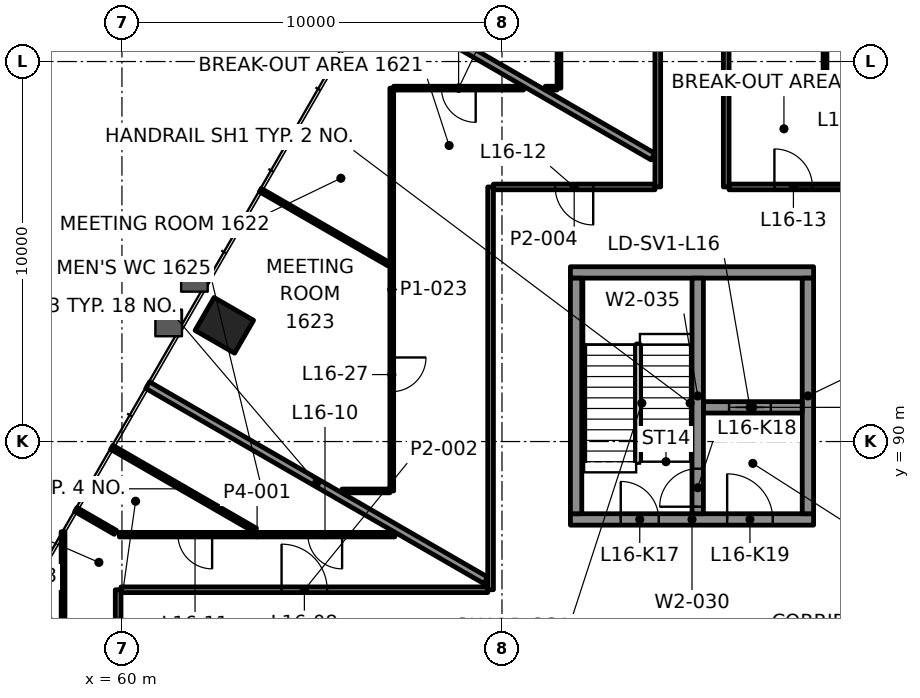
"""IFC4 building model, lengths in metres.
Left out: names, types, materials, properties, quantities, classifications, styles, units other than length and angle.
Written with IfcOpenShell. Run it as: python <this file> out.ifc"""

import sys

from ifc_helpers import new_model, si_unit, direction, frame, frame_2d, origin, origin_2d, place, context, subcontext, project, spatial, rectangle, extrude, element, fill, save


model = new_model("IFC4")
c1 = context("Model", 3, precision=1e-05, world=origin(), true_north=direction((0.0, 1.0)))
c2 = subcontext(c1, "Body", "Model", "MODEL_VIEW")
j1 = project(units=[si_unit("LENGTHUNIT", "METRE"), si_unit("PLANEANGLEUNIT", "RADIAN")], contexts=[c1])
p1 = place(None, origin())
s1 = spatial("IfcSite", under=j1, at=p1, CompositionType="ELEMENT")
p2 = place(p1, origin())
s2 = spatial("IfcBuilding", under=s1, at=p2, CompositionType="ELEMENT")
p3 = place(p2, frame((0.0, 0.0, 73.6)))
s3 = spatial("IfcBuildingStorey", under=s2, at=p3, CompositionType="ELEMENT", Elevation=73.6)
for number, where, z_axis, x_axis in (
    (1, (62.694, 93.057, -0.0), (0.0, 0.0, 1.0), (-0.5, -0.866, 0.0)),
    (2, (57.951, 84.843, -0.0), (0.0, 0.0, 1.0), (-0.5, -0.866, 0.0)),
):
    element("IfcColumn", number, at=place(p3, frame(where, z_axis=z_axis, x_axis=x_axis)), inside=s3, PredefinedType="COLUMN", context=c2, shape_type="SweptSolid", body=[
        extrude(rectangle(XDim=1.0, YDim=1.2, at=origin_2d()), origin(), (0.0, 0.0, 1.0), 4.2),
    ])
p4 = place(p3, frame((71.8, 87.95, 0.0), z_axis=(0.0, 0.0, 1.0), x_axis=(1.0, 0.0, 0.0)))
e3 = element("IfcWall", 3, at=p4, inside=s3, PredefinedType="SHEAR", context=c2, shape_type="SweptSolid", body=[
    extrude(rectangle(XDim=6.4, YDim=0.3, at=frame_2d((3.2, 0.0))), origin(), (0.0, 0.0, 1.0), 4.0),
])
p5 = place(p4, frame((1.325, 0.0, 0.0)))
e4 = element("IfcOpeningElement", 4, at=p5, cuts=e3, PredefinedType="OPENING", context=c2, shape_type="SweptSolid", body=[
    extrude(rectangle(XDim=1.0, YDim=2.1, at=frame_2d((0.5, 1.05))), frame((0.0, 0.16, 0.0), z_axis=(0.0, -1.0, 0.0), x_axis=(1.0, 0.0, 0.0)), (0.0, 0.0, 1.0), 0.32),
])
p6 = place(p4, frame((4.125, 0.0, 0.0)))
e5 = element("IfcOpeningElement", 5, at=p6, cuts=e3, PredefinedType="OPENING", context=c2, shape_type="SweptSolid", body=[
    extrude(rectangle(XDim=1.2, YDim=2.1, at=frame_2d((0.6, 1.05))), frame((0.0, 0.16, 0.0), z_axis=(0.0, -1.0, 0.0), x_axis=(1.0, 0.0, 0.0)), (0.0, 0.0, 1.0), 0.32),
])
p7 = place(p3, frame((71.8, 94.45, 0.0), z_axis=(0.0, 0.0, 1.0), x_axis=(1.0, 0.0, 0.0)))
e6 = element("IfcWall", 6, at=p7, inside=s3, PredefinedType="SHEAR", context=c2, shape_type="SweptSolid", body=[
    extrude(rectangle(XDim=6.4, YDim=0.3, at=frame_2d((3.2, 0.0))), origin(), (0.0, 0.0, 1.0), 4.0),
])
for number, where, z_axis, x_axis in (
    (7, (71.95, 88.1, 0.0), (0.0, 0.0, 1.0), (0.0, 1.0, 0.0)),
    (8, (78.05, 88.1, 0.0), (0.0, 0.0, 1.0), (0.0, 1.0, 0.0)),
):
    element("IfcWall", number, at=place(p3, frame(where, z_axis=z_axis, x_axis=x_axis)), inside=s3, PredefinedType="SHEAR", context=c2, shape_type="SweptSolid", body=[
        extrude(rectangle(XDim=6.2, YDim=0.3, at=frame_2d((3.1, 0.0))), origin(), (0.0, 0.0, 1.0), 4.0),
    ])
p8 = place(p3, frame((75.3, 90.9, 0.0), z_axis=(0.0, 0.0, 1.0), x_axis=(1.0, 0.0, 0.0)))
e9 = element("IfcWall", 9, at=p8, inside=s3, PredefinedType="SHEAR", context=c2, shape_type="SweptSolid", body=[
    extrude(rectangle(XDim=2.6, YDim=0.3, at=frame_2d((1.3, 0.0))), origin(), (0.0, 0.0, 1.0), 4.0),
])
p9 = place(p8, frame((0.675, 0.0, 0.0)))
e10 = element("IfcOpeningElement", 10, at=p9, cuts=e9, PredefinedType="OPENING", context=c2, shape_type="SweptSolid", body=[
    extrude(rectangle(XDim=1.1, YDim=2.1, at=frame_2d((0.55, 1.05))), frame((0.0, 0.16, 0.0), z_axis=(0.0, -1.0, 0.0), x_axis=(1.0, 0.0, 0.0)), (0.0, 0.0, 1.0), 0.32),
])
p10 = place(p3, frame((75.15, 88.1, 0.0), z_axis=(0.0, 0.0, 1.0), x_axis=(0.0, 1.0, 0.0)))
e11 = element("IfcWall", 11, at=p10, inside=s3, PredefinedType="SHEAR", context=c2, shape_type="SweptSolid", body=[
    extrude(rectangle(XDim=6.2, YDim=0.3, at=frame_2d((3.1, 0.0))), origin(), (0.0, 0.0, 1.0), 4.0),
])
p11 = place(p10, frame((0.185, 0.0, 0.0)))
e12 = element("IfcOpeningElement", 12, at=p11, cuts=e11, PredefinedType="OPENING", context=c2, shape_type="SweptSolid", body=[
    extrude(rectangle(XDim=1.0, YDim=2.1, at=frame_2d((0.5, 1.05))), frame((0.0, 0.16, 0.0), z_axis=(0.0, -1.0, 0.0), x_axis=(1.0, 0.0, 0.0)), (0.0, 0.0, 1.0), 0.32),
])
p12 = place(p3, frame((59.976, 86.1, 0.0), z_axis=(0.0, 0.0, 1.0), x_axis=(1.0, 0.0, 0.0)))
e13 = element("IfcWall", 13, at=p12, inside=s3, PredefinedType="PARTITIONING", context=c2, shape_type="SweptSolid", body=[
    extrude(rectangle(XDim=9.649, YDim=0.15, at=frame_2d((4.825, 0.0))), origin(), (0.0, 0.0, 1.0), 3.4),
])
p13 = place(p12, frame((4.225, 0.0, 0.0)))
e14 = element("IfcOpeningElement", 14, at=p13, cuts=e13, PredefinedType="OPENING", context=c2, shape_type="SweptSolid", body=[
    extrude(rectangle(XDim=1.2, YDim=2.1, at=frame_2d((0.6, 1.05))), frame((0.0, 0.085, 0.0), z_axis=(0.0, -1.0, 0.0), x_axis=(1.0, 0.0, 0.0)), (0.0, 0.0, 1.0), 0.17),
])
p14 = place(p3, frame((67.181, 87.55, 0.0), z_axis=(0.0, 0.0, 1.0), x_axis=(-1.0, 0.0, 0.0)))
e15 = element("IfcWall", 15, at=p14, inside=s3, PredefinedType="PARTITIONING", context=c2, shape_type="SweptSolid", body=[
    extrude(rectangle(XDim=7.249, YDim=0.12, at=frame_2d((3.625, 0.0))), origin(), (0.0, 0.0, 1.0), 3.4),
])
p15 = place(p14, frame((1.388, 0.0, 0.0)))
e16 = element("IfcOpeningElement", 16, at=p15, cuts=e15, PredefinedType="OPENING", context=c2, shape_type="SweptSolid", body=[
    extrude(rectangle(XDim=0.9, YDim=2.1, at=frame_2d((0.45, 1.05))), frame((0.0, 0.07, 0.0), z_axis=(0.0, -1.0, 0.0), x_axis=(1.0, 0.0, 0.0)), (0.0, 0.0, 1.0), 0.14),
])
p16 = place(p14, frame((4.807, 0.0, 0.0)))
e17 = element("IfcOpeningElement", 17, at=p16, cuts=e15, PredefinedType="OPENING", context=c2, shape_type="SweptSolid", body=[
    extrude(rectangle(XDim=0.9, YDim=2.1, at=frame_2d((0.45, 1.05))), frame((0.0, 0.07, 0.0), z_axis=(0.0, -1.0, 0.0), x_axis=(1.0, 0.0, 0.0)), (0.0, 0.0, 1.0), 0.14),
])
p17 = place(p3, frame((65.789, 88.7, 0.0), z_axis=(0.0, 0.0, 1.0), x_axis=(1.0, 0.0, 0.0)))
e18 = element("IfcWall", 18, at=p17, inside=s3, PredefinedType="PARTITIONING", context=c2, shape_type="SweptSolid", body=[
    extrude(rectangle(XDim=1.261, YDim=0.1, at=frame_2d((0.631, 0.0))), origin(), (0.0, 0.0, 1.0), 3.4),
])
p18 = place(p3, frame((74.025, 96.7, 0.0), z_axis=(0.0, 0.0, 1.0), x_axis=(-1.0, 0.0, 0.0)))
e19 = element("IfcWall", 19, at=p18, inside=s3, PredefinedType="PARTITIONING", context=c2, shape_type="SweptSolid", body=[
    extrude(rectangle(XDim=4.25, YDim=0.15, at=frame_2d((2.125, 0.0))), origin(), (0.0, 0.0, 1.0), 3.4),
])
p19 = place(p18, frame((1.625, 0.0, 0.0)))
e20 = element("IfcOpeningElement", 20, at=p19, cuts=e19, PredefinedType="OPENING", context=c2, shape_type="SweptSolid", body=[
    extrude(rectangle(XDim=1.0, YDim=2.1, at=frame_2d((0.5, 1.05))), frame((0.0, 0.085, 0.0), z_axis=(0.0, -1.0, 0.0), x_axis=(1.0, 0.0, 0.0)), (0.0, 0.0, 1.0), 0.17),
])
p20 = place(p3, frame((75.975, 96.7, 0.0), z_axis=(0.0, 0.0, 1.0), x_axis=(1.0, 0.0, 0.0)))
e21 = element("IfcWall", 21, at=p20, inside=s3, PredefinedType="PARTITIONING", context=c2, shape_type="SweptSolid", body=[
    extrude(rectangle(XDim=3.387, YDim=0.15, at=frame_2d((1.693, 0.0))), origin(), (0.0, 0.0, 1.0), 3.4),
])
p21 = place(p20, frame((1.194, 0.0, 0.0)))
e22 = element("IfcOpeningElement", 22, at=p21, cuts=e21, PredefinedType="OPENING", context=c2, shape_type="SweptSolid", body=[
    extrude(rectangle(XDim=1.0, YDim=2.1, at=frame_2d((0.5, 1.05))), frame((0.0, 0.085, 0.0), z_axis=(0.0, -1.0, 0.0), x_axis=(1.0, 0.0, 0.0)), (0.0, 0.0, 1.0), 0.17),
])
p22 = place(p3, frame((70.567, 99.3, 0.0), z_axis=(0.0, 0.0, 1.0), x_axis=(-1.0, 0.0, 0.0)))
e23 = element("IfcWall", 23, at=p22, inside=s3, PredefinedType="PARTITIONING", context=c2, shape_type="SweptSolid", body=[
    extrude(rectangle(XDim=3.417, YDim=0.1, at=frame_2d((1.708, 0.0))), origin(), (0.0, 0.0, 1.0), 3.4),
])
p23 = place(p22, frame((1.258, 0.0, 0.0)))
e24 = element("IfcOpeningElement", 24, at=p23, cuts=e23, PredefinedType="OPENING", context=c2, shape_type="SweptSolid", body=[
    extrude(rectangle(XDim=0.9, YDim=2.1, at=frame_2d((0.45, 1.05))), frame((0.0, 0.06, 0.0), z_axis=(0.0, -1.0, 0.0), x_axis=(1.0, 0.0, 0.0)), (0.0, 0.0, 1.0), 0.12),
])
p24 = place(p3, frame((78.55, 99.3, 0.0), z_axis=(0.0, 0.0, 1.0), x_axis=(1.0, 0.0, 0.0)))
e25 = element("IfcWall", 25, at=p24, inside=s3, PredefinedType="PARTITIONING", context=c2, shape_type="SweptSolid", body=[
    extrude(rectangle(XDim=4.349, YDim=0.1, at=frame_2d((2.175, 0.0))), origin(), (0.0, 0.0, 1.0), 3.4),
])
p25 = place(p24, frame((1.725, 0.0, 0.0)))
e26 = element("IfcOpeningElement", 26, at=p25, cuts=e25, PredefinedType="OPENING", context=c2, shape_type="SweptSolid", body=[
    extrude(rectangle(XDim=0.9, YDim=2.1, at=frame_2d((0.45, 1.05))), frame((0.0, 0.06, 0.0), z_axis=(0.0, -1.0, 0.0), x_axis=(1.0, 0.0, 0.0)), (0.0, 0.0, 1.0), 0.12),
])
p26 = place(p3, frame((78.5, 99.3, 0.0), z_axis=(0.0, 0.0, 1.0), x_axis=(0.0, 1.0, 0.0)))
e27 = element("IfcWall", 27, at=p26, inside=s3, PredefinedType="PARTITIONING", context=c2, shape_type="SweptSolid", body=[
    extrude(rectangle(XDim=9.736, YDim=0.1, at=frame_2d((4.868, 0.0))), origin(), (0.0, 0.0, 1.0), 3.4),
])
p27 = place(p26, frame((6.382, 0.0, 0.0)))
e28 = element("IfcOpeningElement", 28, at=p27, cuts=e27, PredefinedType="OPENING", context=c2, shape_type="SweptSolid", body=[
    extrude(rectangle(XDim=0.9, YDim=2.1, at=frame_2d((0.45, 1.05))), frame((0.0, 0.06, 0.0), z_axis=(0.0, -1.0, 0.0), x_axis=(1.0, 0.0, 0.0)), (0.0, 0.0, 1.0), 0.12),
])
p28 = place(p3, frame((75.9, 96.7, 0.0), z_axis=(0.0, 0.0, 1.0), x_axis=(0.0, 1.0, 0.0)))
e29 = element("IfcWall", 29, at=p28, inside=s3, PredefinedType="PARTITIONING", context=c2, shape_type="SweptSolid", body=[
    extrude(rectangle(XDim=9.737, YDim=0.15, at=frame_2d((4.868, 0.0))), origin(), (0.0, 0.0, 1.0), 3.4),
])
p29 = place(p3, frame((74.1, 96.7, 0.0), z_axis=(0.0, 0.0, 1.0), x_axis=(0.0, 1.0, 0.0)))
e30 = element("IfcWall", 30, at=p29, inside=s3, PredefinedType="PARTITIONING", context=c2, shape_type="SweptSolid", body=[
    extrude(rectangle(XDim=9.736, YDim=0.15, at=frame_2d((4.868, 0.0))), origin(), (0.0, 0.0, 1.0), 3.4),
])
p30 = place(p29, frame((4.629, 0.0, 0.0)))
e31 = element("IfcOpeningElement", 31, at=p30, cuts=e30, PredefinedType="OPENING", context=c2, shape_type="SweptSolid", body=[
    extrude(rectangle(XDim=1.0, YDim=2.1, at=frame_2d((0.5, 1.05))), frame((0.0, 0.085, 0.0), z_axis=(0.0, -1.0, 0.0), x_axis=(1.0, 0.0, 0.0)), (0.0, 0.0, 1.0), 0.17),
])
p31 = place(p3, frame((71.5, 104.801, 0.0), z_axis=(0.0, 0.0, 1.0), x_axis=(0.0, -1.0, 0.0)))
e32 = element("IfcWall", 32, at=p31, inside=s3, PredefinedType="PARTITIONING", context=c2, shape_type="SweptSolid", body=[
    extrude(rectangle(XDim=5.501, YDim=0.1, at=frame_2d((2.75, 0.0))), origin(), (0.0, 0.0, 1.0), 3.4),
])
p32 = place(p31, frame((2.301, 0.0, 0.0)))
e33 = element("IfcOpeningElement", 33, at=p32, cuts=e32, PredefinedType="OPENING", context=c2, shape_type="SweptSolid", body=[
    extrude(rectangle(XDim=0.9, YDim=2.1, at=frame_2d((0.45, 1.05))), frame((0.0, 0.06, 0.0), z_axis=(0.0, -1.0, 0.0), x_axis=(1.0, 0.0, 0.0)), (0.0, 0.0, 1.0), 0.12),
])
p33 = place(p3, frame((69.7, 86.1, 0.0), z_axis=(0.0, 0.0, 1.0), x_axis=(0.0, 1.0, 0.0)))
e34 = element("IfcWall", 34, at=p33, inside=s3, PredefinedType="PARTITIONING", context=c2, shape_type="SweptSolid", body=[
    extrude(rectangle(XDim=10.6, YDim=0.15, at=frame_2d((5.3, 0.0))), origin(), (0.0, 0.0, 1.0), 3.4),
])
p34 = place(p3, frame((67.1, 99.3, 0.0), z_axis=(0.0, 0.0, 1.0), x_axis=(0.0, -1.0, 0.0)))
e35 = element("IfcWall", 35, at=p34, inside=s3, PredefinedType="PARTITIONING", context=c2, shape_type="SweptSolid", body=[
    extrude(rectangle(XDim=10.6, YDim=0.1, at=frame_2d((5.3, 0.0))), origin(), (0.0, 0.0, 1.0), 3.4),
])
p35 = place(p34, frame((7.088, 0.0, 0.0)))
e36 = element("IfcOpeningElement", 36, at=p35, cuts=e35, PredefinedType="OPENING", context=c2, shape_type="SweptSolid", body=[
    extrude(rectangle(XDim=0.9, YDim=2.1, at=frame_2d((0.45, 1.05))), frame((0.0, 0.06, 0.0), z_axis=(0.0, -1.0, 0.0), x_axis=(1.0, 0.0, 0.0)), (0.0, 0.0, 1.0), 0.12),
])
p36 = place(p3, frame((59.9, 67.321, 0.0), z_axis=(0.0, 0.0, 1.0), x_axis=(0.0, 1.0, 0.0)))
e37 = element("IfcWall", 37, at=p36, inside=s3, PredefinedType="PARTITIONING", context=c2, shape_type="SweptSolid", body=[
    extrude(rectangle(XDim=18.778, YDim=0.15, at=frame_2d((9.389, 0.0))), origin(), (0.0, 0.0, 1.0), 3.4),
])
p37 = place(p3, frame((58.45, 85.133, 0.0), z_axis=(0.0, 0.0, 1.0), x_axis=(0.0, 1.0, 0.0)))
e38 = element("IfcWall", 38, at=p37, inside=s3, PredefinedType="PARTITIONING", context=c2, shape_type="SweptSolid", body=[
    extrude(rectangle(XDim=2.494, YDim=0.1, at=frame_2d((1.247, 0.0))), origin(), (0.0, 0.0, 1.0), 3.165),
])
p38 = place(p3, frame((73.973, 97.499, 0.0), z_axis=(0.0, 0.0, 1.0), x_axis=(-0.866037536751, 0.499978984496, 0.0)))
e39 = element("IfcWall", 39, at=p38, inside=s3, PredefinedType="PARTITIONING", context=c2, shape_type="SweptSolid", body=[
    extrude(rectangle(XDim=6.948, YDim=0.2, at=frame_2d((3.474, 0.0))), origin(), (0.0, 0.0, 1.0), 3.4),
])
p39 = place(p3, frame((67.024, 94.665, 0.0), z_axis=(0.0, 0.0, 1.0), x_axis=(-0.866046116492, 0.499964122822, 0.0)))
e40 = element("IfcWall", 40, at=p39, inside=s3, PredefinedType="PARTITIONING", context=c2, shape_type="SweptSolid", body=[
    extrude(rectangle(XDim=3.906, YDim=0.1, at=frame_2d((1.953, 0.0))), origin(), (0.0, 0.0, 1.0), 3.165),
])
p40 = place(p3, frame((69.573, 86.348, 0.0), z_axis=(0.0, 0.0, 1.0), x_axis=(-0.866024495625, 0.500001572974, 0.0)))
e41 = element("IfcWall", 41, at=p40, inside=s3, PredefinedType="PARTITIONING", context=c2, shape_type="SweptSolid", body=[
    extrude(rectangle(XDim=10.272, YDim=0.2, at=frame_2d((5.136, 0.0))), origin(), (0.0, 0.0, 1.0), 3.165),
])
p41 = place(p3, frame((63.512, 87.665, 0.0), z_axis=(0.0, 0.0, 1.0), x_axis=(-0.866014185868, 0.500019429497, 0.0)))
e42 = element("IfcWall", 42, at=p41, inside=s3, PredefinedType="PARTITIONING", context=c2, shape_type="SweptSolid", body=[
    extrude(rectangle(XDim=4.365, YDim=0.12, at=frame_2d((2.182, 0.0))), origin(), (0.0, 0.0, 1.0), 3.165),
])
p42 = place(p3, frame((59.828, 87.61, 0.0), z_axis=(0.0, 0.0, 1.0), x_axis=(-0.865996090227, 0.500050769134, 0.0)))
e43 = element("IfcWall", 43, at=p42, inside=s3, PredefinedType="PARTITIONING", context=c2, shape_type="SweptSolid", body=[
    extrude(rectangle(XDim=1.202, YDim=0.12, at=frame_2d((0.601, 0.0))), origin(), (0.0, 0.0, 1.0), 3.165),
])
p43 = place(p3, frame((71.14, 99.3, 0.0), z_axis=(0.0, 0.0, 1.0), x_axis=(1.0, 0.0, 0.0)))
e44 = element("IfcWall", 44, at=p43, inside=s3, PredefinedType="PARTITIONING", context=c2, shape_type="SweptSolid", body=[
    extrude(rectangle(XDim=0.31, YDim=0.1, at=frame_2d((0.155, 0.0))), origin(), (0.0, 0.0, 1.0), 3.4),
])
p44 = place(p13, origin())
e45 = element("IfcDoor", 45, at=p44, inside=s3, OperationType="DOUBLE_DOOR_SINGLE_SWING", PredefinedType="DOOR", context=c2, shape_type="SweptSolid", body=[
    extrude(rectangle(XDim=1.2, YDim=2.1, at=frame_2d((0.6, 1.05))), frame((0.0, 0.025, 0.0), z_axis=(0.0, -1.0, 0.0), x_axis=(1.0, 0.0, 0.0)), (0.0, 0.0, 1.0), 0.05),
])
fill(e14, e45)
p45 = place(p15, origin())
e46 = element("IfcDoor", 46, at=p45, inside=s3, OperationType="SINGLE_SWING_LEFT", PredefinedType="DOOR", context=c2, shape_type="SweptSolid", body=[
    extrude(rectangle(XDim=0.9, YDim=2.1, at=frame_2d((0.45, 1.05))), frame((0.0, 0.025, 0.0), z_axis=(0.0, -1.0, 0.0), x_axis=(1.0, 0.0, 0.0)), (0.0, 0.0, 1.0), 0.05),
])
fill(e16, e46)
p46 = place(p16, origin())
e47 = element("IfcDoor", 47, at=p46, inside=s3, OperationType="SINGLE_SWING_RIGHT", PredefinedType="DOOR", context=c2, shape_type="SweptSolid", body=[
    extrude(rectangle(XDim=0.9, YDim=2.1, at=frame_2d((0.45, 1.05))), frame((0.0, 0.025, 0.0), z_axis=(0.0, -1.0, 0.0), x_axis=(1.0, 0.0, 0.0)), (0.0, 0.0, 1.0), 0.05),
])
fill(e17, e47)
p47 = place(p19, origin())
e48 = element("IfcDoor", 48, at=p47, inside=s3, OperationType="SINGLE_SWING_LEFT", PredefinedType="DOOR", context=c2, shape_type="SweptSolid", body=[
    extrude(rectangle(XDim=1.0, YDim=2.1, at=frame_2d((0.5, 1.05))), frame((0.0, 0.025, 0.0), z_axis=(0.0, -1.0, 0.0), x_axis=(1.0, 0.0, 0.0)), (0.0, 0.0, 1.0), 0.05),
])
fill(e20, e48)
p48 = place(p21, origin())
e49 = element("IfcDoor", 49, at=p48, inside=s3, OperationType="SINGLE_SWING_LEFT", PredefinedType="DOOR", context=c2, shape_type="SweptSolid", body=[
    extrude(rectangle(XDim=1.0, YDim=2.1, at=frame_2d((0.5, 1.05))), frame((0.0, 0.025, 0.0), z_axis=(0.0, -1.0, 0.0), x_axis=(1.0, 0.0, 0.0)), (0.0, 0.0, 1.0), 0.05),
])
fill(e22, e49)
p49 = place(p23, origin())
e50 = element("IfcDoor", 50, at=p49, inside=s3, OperationType="SINGLE_SWING_RIGHT", PredefinedType="DOOR", context=c2, shape_type="SweptSolid", body=[
    extrude(rectangle(XDim=0.9, YDim=2.1, at=frame_2d((0.45, 1.05))), frame((0.0, 0.025, 0.0), z_axis=(0.0, -1.0, 0.0), x_axis=(1.0, 0.0, 0.0)), (0.0, 0.0, 1.0), 0.05),
])
fill(e24, e50)
p50 = place(p35, origin())
e51 = element("IfcDoor", 51, at=p50, inside=s3, OperationType="SINGLE_SWING_LEFT", PredefinedType="DOOR", context=c2, shape_type="SweptSolid", body=[
    extrude(rectangle(XDim=0.9, YDim=2.1, at=frame_2d((0.45, 1.05))), frame((0.0, 0.025, 0.0), z_axis=(0.0, -1.0, 0.0), x_axis=(1.0, 0.0, 0.0)), (0.0, 0.0, 1.0), 0.05),
])
fill(e36, e51)
p51 = place(p9, origin())
e52 = element("IfcDoor", 52, at=p51, inside=s3, OperationType="DOUBLE_DOOR_SLIDING", PredefinedType="DOOR", context=c2, shape_type="SweptSolid", body=[
    extrude(rectangle(XDim=1.1, YDim=2.1, at=frame_2d((0.55, 1.05))), frame((0.0, 0.025, 0.0), z_axis=(0.0, -1.0, 0.0), x_axis=(1.0, 0.0, 0.0)), (0.0, 0.0, 1.0), 0.05),
])
fill(e10, e52)
p52 = place(p5, origin())
e53 = element("IfcDoor", 53, at=p52, inside=s3, OperationType="SINGLE_SWING_RIGHT", PredefinedType="DOOR", context=c2, shape_type="SweptSolid", body=[
    extrude(rectangle(XDim=1.0, YDim=2.1, at=frame_2d((0.5, 1.05))), frame((0.0, 0.025, 0.0), z_axis=(0.0, -1.0, 0.0), x_axis=(1.0, 0.0, 0.0)), (0.0, 0.0, 1.0), 0.05),
])
fill(e4, e53)
p53 = place(p11, origin())
e54 = element("IfcDoor", 54, at=p53, inside=s3, OperationType="SINGLE_SWING_LEFT", PredefinedType="DOOR", context=c2, shape_type="SweptSolid", body=[
    extrude(rectangle(XDim=1.0, YDim=2.1, at=frame_2d((0.5, 1.05))), frame((0.0, 0.025, 0.0), z_axis=(0.0, -1.0, 0.0), x_axis=(1.0, 0.0, 0.0)), (0.0, 0.0, 1.0), 0.05),
])
fill(e12, e54)
p54 = place(p6, origin())
e55 = element("IfcDoor", 55, at=p54, inside=s3, OperationType="SINGLE_SWING_RIGHT", PredefinedType="DOOR", context=c2, shape_type="SweptSolid", body=[
    extrude(rectangle(XDim=1.2, YDim=2.1, at=frame_2d((0.6, 1.05))), frame((0.0, 0.025, 0.0), z_axis=(0.0, -1.0, 0.0), x_axis=(1.0, 0.0, 0.0)), (0.0, 0.0, 1.0), 0.05),
])
fill(e5, e55)
save(model, sys.argv[1])
